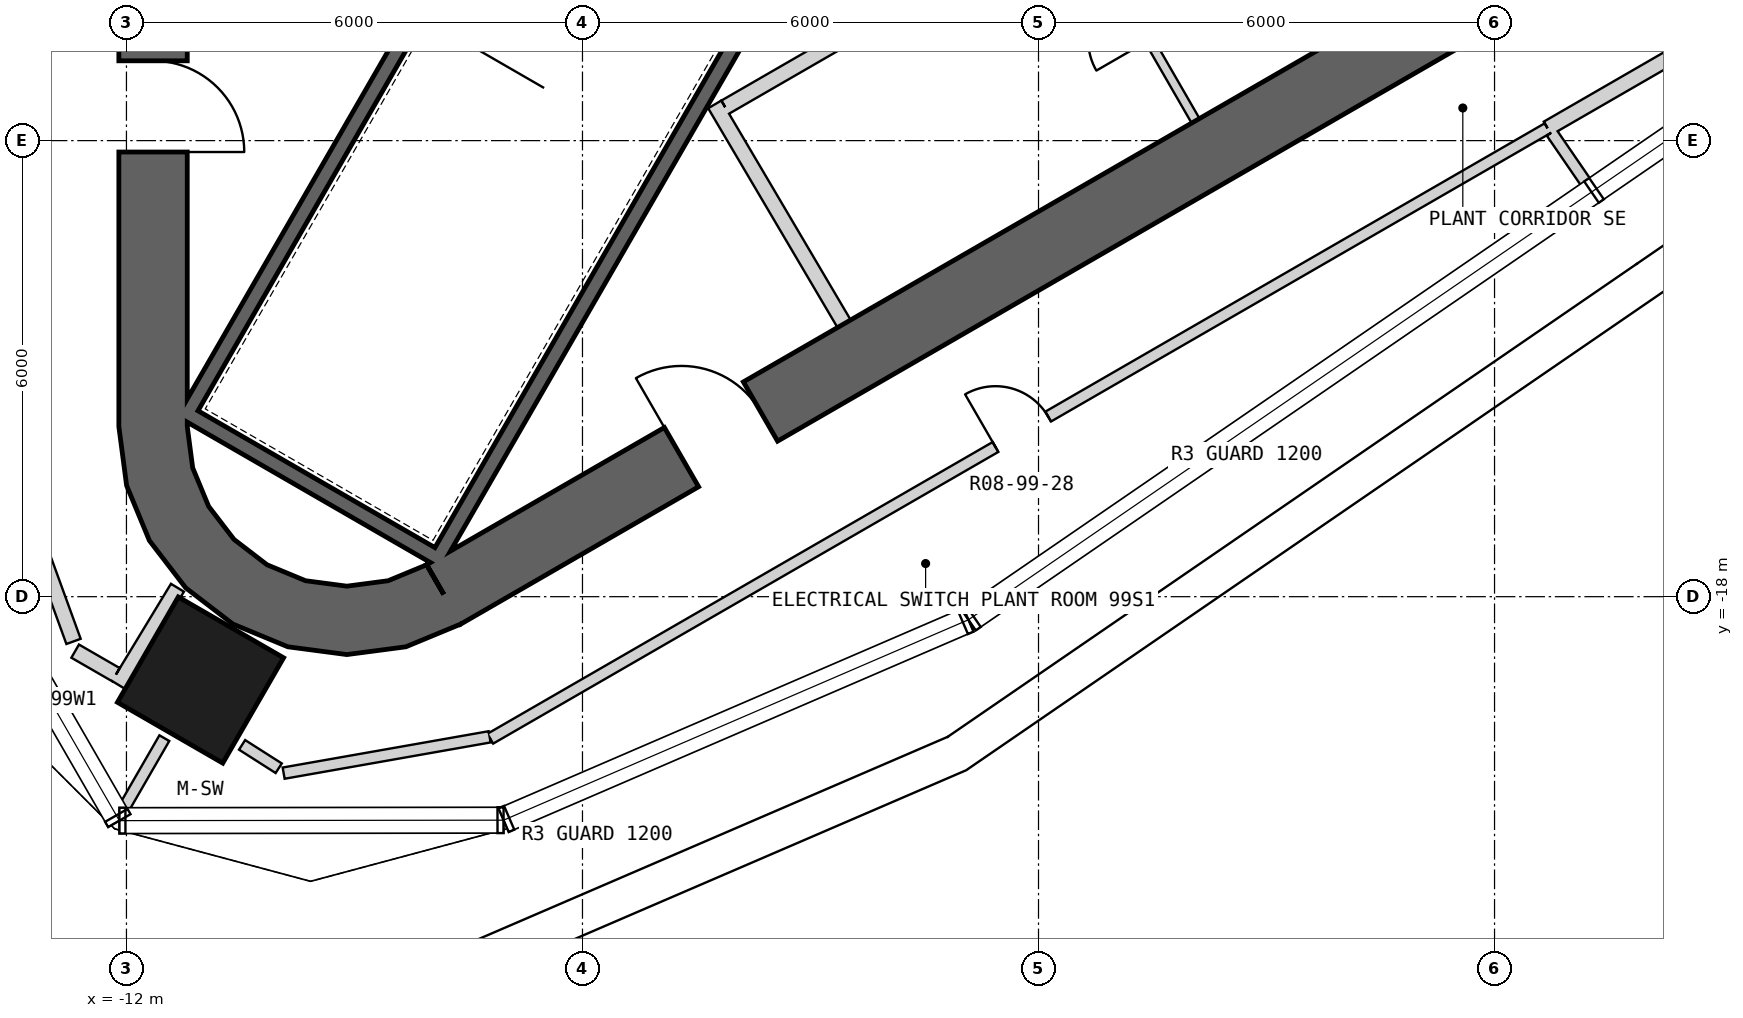
"""IFC4 building model, lengths in metres.
Left out: names, types, materials, properties, quantities, classifications, styles, units other than length and angle.
Written with IfcOpenShell. Run it as: python <this file> out.ifc"""

import sys

from ifc_helpers import new_model, si_unit, direction, frame, frame_2d, origin, origin_2d, place, context, subcontext, project, spatial, polyline, rectangle, outline, extrude, element, fill, save


model = new_model("IFC4")
c1 = context("Model", 3, precision=1e-05, world=origin(), true_north=direction((0.0, 1.0)))
c2 = subcontext(c1, "Body", "Model", "MODEL_VIEW")
j1 = project(units=[si_unit("LENGTHUNIT", "METRE"), si_unit("PLANEANGLEUNIT", "RADIAN")], contexts=[c1])
p1 = place(None, origin())
s1 = spatial("IfcSite", under=j1, at=p1, CompositionType="ELEMENT")
p2 = place(p1, origin())
s2 = spatial("IfcBuilding", under=s1, at=p2, CompositionType="ELEMENT")
p3 = place(p2, frame((0.0, 0.0, 440.3)))
s3 = spatial("IfcBuildingStorey", under=s2, at=p3, CompositionType="ELEMENT", Elevation=440.3)
p4 = place(p3, frame((-11.025, -19.097, 0.0), z_axis=(0.0, 0.0, 1.0), x_axis=(-0.5, -0.866025403784, 0.0)))
e1 = element("IfcColumn", 1, at=p4, inside=s3, PredefinedType="COLUMN", context=c2, shape_type="SweptSolid", body=[
    extrude(rectangle(XDim=1.6, YDim=1.6, at=origin_2d()), origin(), (0.0, 0.0, 1.0), 4.7),
])
p5 = place(p3, frame((-11.65, 15.762, 0.0), z_axis=(0.0, 0.0, 1.0), x_axis=(0.0, -1.0, 0.0)))
e2 = element("IfcWall", 2, at=p5, inside=s3, PredefinedType="SHEAR", context=c2, shape_type="SweptSolid", body=[
    extrude(rectangle(XDim=31.523, YDim=0.9, at=frame_2d((15.762, 0.0))), origin(), (0.0, 0.0, 1.0), 4.7),
])
p6 = place(p5, frame((3.612, 0.0, 0.0)))
e3 = element("IfcOpeningElement", 3, at=p6, cuts=e2, PredefinedType="OPENING", context=c2, shape_type="SweptSolid", body=[
    extrude(rectangle(XDim=1.2, YDim=2.4, at=frame_2d((0.6, 1.2))), frame((0.0, 0.46, 0.0), z_axis=(0.0, -1.0, 0.0), x_axis=(1.0, 0.0, 0.0)), (0.0, 0.0, 1.0), 0.92),
])
p7 = place(p5, frame((26.712, 0.0, 0.0)))
e4 = element("IfcOpeningElement", 4, at=p7, cuts=e2, PredefinedType="OPENING", context=c2, shape_type="SweptSolid", body=[
    extrude(rectangle(XDim=1.2, YDim=2.4, at=frame_2d((0.6, 1.2))), frame((0.0, 0.46, 0.0), z_axis=(0.0, -1.0, 0.0), x_axis=(1.0, 0.0, 0.0)), (0.0, 0.0, 1.0), 0.92),
])
p8 = place(p3, frame((-7.825, -17.97, 0.0), z_axis=(0.0, 0.0, 1.0), x_axis=(0.866028369851, 0.499994862586, 0.0)))
e5 = element("IfcWall", 5, at=p8, inside=s3, PredefinedType="SHEAR", context=c2, shape_type="SweptSolid", body=[
    extrude(rectangle(XDim=31.523, YDim=0.9, at=frame_2d((15.762, 0.0))), origin(), (0.0, 0.0, 1.0), 4.7),
])
p9 = place(p8, frame((17.862, 0.0, 0.0)))
e6 = element("IfcOpeningElement", 6, at=p9, cuts=e5, PredefinedType="OPENING", context=c2, shape_type="SweptSolid", body=[
    extrude(rectangle(XDim=1.2, YDim=2.4, at=frame_2d((0.6, 1.2))), frame((0.0, 0.46, 0.0), z_axis=(0.0, -1.0, 0.0), x_axis=(1.0, 0.0, 0.0)), (0.0, 0.0, 1.0), 0.92),
])
p10 = place(p8, frame((20.562, 0.0, 0.0)))
e7 = element("IfcOpeningElement", 7, at=p10, cuts=e5, PredefinedType="OPENING", context=c2, shape_type="SweptSolid", body=[
    extrude(rectangle(XDim=1.2, YDim=2.4, at=frame_2d((0.6, 1.2))), frame((0.0, 0.46, 0.0), z_axis=(0.0, -1.0, 0.0), x_axis=(1.0, 0.0, 0.0)), (0.0, 0.0, 1.0), 0.92),
])
p11 = place(p8, frame((26.712, 0.0, 0.0)))
e8 = element("IfcOpeningElement", 8, at=p11, cuts=e5, PredefinedType="OPENING", context=c2, shape_type="SweptSolid", body=[
    extrude(rectangle(XDim=1.2, YDim=2.4, at=frame_2d((0.6, 1.2))), frame((0.0, 0.46, 0.0), z_axis=(0.0, -1.0, 0.0), x_axis=(1.0, 0.0, 0.0)), (0.0, 0.0, 1.0), 0.92),
])
p12 = place(p8, frame((3.612, 0.0, 0.0)))
e9 = element("IfcOpeningElement", 9, at=p12, cuts=e5, PredefinedType="OPENING", context=c2, shape_type="SweptSolid", body=[
    extrude(rectangle(XDim=1.2, YDim=2.4, at=frame_2d((0.6, 1.2))), frame((0.0, 0.46, 0.0), z_axis=(0.0, -1.0, 0.0), x_axis=(1.0, 0.0, 0.0)), (0.0, 0.0, 1.0), 0.92),
])
p13 = place(p3, origin())
e10 = element("IfcWall", 10, at=p13, inside=s3, PredefinedType="SHEAR", context=c2, shape_type="SweptSolid", body=[
    extrude(outline(polyline([(-12.1, -15.762), (-11.998, -16.538), (-11.698, -17.262), (-11.221, -17.883), (-10.6, -18.36), (-9.876, -18.659), (-9.1, -18.762), (-8.323, -18.659), (-7.6, -18.36), (-8.05, -17.58), (-8.556, -17.79), (-9.1, -17.862), (-9.644, -17.79), (-10.15, -17.58), (-10.585, -17.247), (-10.919, -16.812), (-11.128, -16.305), (-11.2, -15.762), (-12.1, -15.762)])), origin(), (0.0, 0.0, 1.0), 4.7),
])
p14 = place(p3, frame((-3.905, -10.563, -0.25), z_axis=(0.0, 0.0, 1.0), x_axis=(-0.500012932018, -0.866017937352, 0.0)))
e11 = element("IfcWall", 11, at=p14, inside=s3, PredefinedType="SHEAR", context=c2, shape_type="SweptSolid", body=[
    extrude(rectangle(XDim=8.1, YDim=0.2, at=frame_2d((4.05, 0.0))), origin(), (0.0, 0.0, 1.0), 4.95),
])
p15 = place(p3, frame((-11.282, -15.541, -0.25), z_axis=(0.0, 0.0, 1.0), x_axis=(0.866000483506, -0.500043160704, 0.0)))
e12 = element("IfcWall", 12, at=p15, inside=s3, PredefinedType="SHEAR", context=c2, shape_type="SweptSolid", body=[
    extrude(rectangle(XDim=3.8, YDim=0.2, at=frame_2d((1.9, 0.0))), origin(), (0.0, 0.0, 1.0), 4.95),
])
p16 = place(p3, frame((-7.196, -8.663, -0.25), z_axis=(0.0, 0.0, 1.0), x_axis=(-0.499997992926, -0.866026562566, 0.0)))
e13 = element("IfcWall", 13, at=p16, inside=s3, PredefinedType="SHEAR", context=c2, shape_type="SweptSolid", body=[
    extrude(rectangle(XDim=7.9, YDim=0.2, at=frame_2d((3.95, 0.0))), origin(), (0.0, 0.0, 1.0), 4.95),
])
p17 = place(p3, frame((2.067, -11.74, 0.0), z_axis=(0.0, 0.0, 1.0), x_axis=(-0.499984717929, 0.866034226713, 0.0)))
e14 = element("IfcWall", 14, at=p17, inside=s3, PredefinedType="PARTITIONING", context=c2, shape_type="SweptSolid", body=[
    extrude(rectangle(XDim=3.25, YDim=0.12, at=frame_2d((1.625, 0.0))), origin(), (0.0, 0.0, 1.0), 4.7),
])
p18 = place(p17, frame((1.225, 0.0, 0.0)))
e15 = element("IfcOpeningElement", 15, at=p18, cuts=e14, PredefinedType="OPENING", context=c2, shape_type="SweptSolid", body=[
    extrude(rectangle(XDim=0.8, YDim=2.1, at=frame_2d((0.4, 1.05))), frame((0.0, 0.07, 0.0), z_axis=(0.0, -1.0, 0.0), x_axis=(1.0, 0.0, 0.0)), (0.0, 0.0, 1.0), 0.14),
])
p19 = place(p3, frame((-4.26, -11.524, 0.0), z_axis=(0.0, 0.0, 1.0), x_axis=(0.507997497166, -0.861358544901, 0.0)))
e16 = element("IfcWall", 16, at=p19, inside=s3, PredefinedType="PARTITIONING", context=c2, shape_type="SweptSolid", body=[
    extrude(rectangle(XDim=3.35, YDim=0.2, at=frame_2d((1.675, 0.0))), origin(), (0.0, 0.0, 1.0), 4.7),
])
p20 = place(p3, frame((-1.024, -9.771, 0.0), z_axis=(0.0, 0.0, 1.0), x_axis=(-0.866029903013, -0.499992207027, 0.0)))
e17 = element("IfcWall", 17, at=p20, inside=s3, PredefinedType="PARTITIONING", context=c2, shape_type="SweptSolid", body=[
    extrude(rectangle(XDim=3.578, YDim=0.2, at=frame_2d((1.789, 0.0))), origin(), (0.0, 0.0, 1.0), 4.7),
])
p21 = place(p3, frame((-12.104, -19.161, 0.0), z_axis=(0.0, 0.0, 1.0), x_axis=(0.518475368733, 0.855092563421, 0.0)))
e18 = element("IfcWall", 18, at=p21, inside=s3, PredefinedType="PARTITIONING", context=c2, shape_type="SweptSolid", body=[
    extrude(rectangle(XDim=1.496, YDim=0.2, at=frame_2d((0.748, 0.0))), origin(), (0.0, 0.0, 1.0), 4.7),
])
p22 = place(p3, frame((-12.675, -18.717, 0.0), z_axis=(0.0, 0.0, 1.0), x_axis=(0.866047486323, -0.49996174997, 0.0)))
e19 = element("IfcWall", 19, at=p22, inside=s3, PredefinedType="PARTITIONING", context=c2, shape_type="SweptSolid", body=[
    extrude(rectangle(XDim=0.618, YDim=0.2, at=frame_2d((0.309, 0.0))), origin(), (0.0, 0.0, 1.0), 4.7),
])
p23 = place(p3, frame((-13.634, -16.011, 0.0), z_axis=(0.0, 0.0, 1.0), x_axis=(0.342043269434, -0.939684203248, 0.0)))
e20 = element("IfcWall", 20, at=p23, inside=s3, PredefinedType="PARTITIONING", context=c2, shape_type="SweptSolid", body=[
    extrude(rectangle(XDim=2.742, YDim=0.2, at=frame_2d((1.371, 0.0))), origin(), (0.0, 0.0, 1.0), 4.7),
])
p24 = place(p3, frame((-11.501, -19.861, 0.0), z_axis=(0.0, 0.0, 1.0), x_axis=(-0.500107244371, -0.865963477364, 0.0)))
e21 = element("IfcWall", 21, at=p24, inside=s3, PredefinedType="PLUMBINGWALL", context=c2, shape_type="SweptSolid", body=[
    extrude(rectangle(XDim=1.098, YDim=0.15, at=frame_2d((0.549, 0.0))), origin(), (0.0, 0.0, 1.0), 4.7),
])
p25 = place(p3, frame((-7.213, -19.868, 0.0), z_axis=(0.0, 0.0, 1.0), x_axis=(0.866026120779, 0.499998758127, 0.0)))
e22 = element("IfcWall", 22, at=p25, inside=s3, PredefinedType="PLUMBINGWALL", context=c2, shape_type="SweptSolid", body=[
    extrude(rectangle(XDim=16.062, YDim=0.15, at=frame_2d((8.031, 0.0))), origin(), (0.0, 0.0, 1.0), 4.7),
])
p26 = place(p25, frame((7.675, 0.0, 0.0)))
e23 = element("IfcOpeningElement", 23, at=p26, cuts=e22, PredefinedType="OPENING", context=c2, shape_type="SweptSolid", body=[
    extrude(rectangle(XDim=0.8, YDim=2.1, at=frame_2d((0.4, 1.05))), frame((0.0, 0.085, 0.0), z_axis=(0.0, -1.0, 0.0), x_axis=(1.0, 0.0, 0.0)), (0.0, 0.0, 1.0), 0.17),
])
p27 = place(p3, frame((-9.932, -20.322, 0.0), z_axis=(0.0, 0.0, 1.0), x_axis=(0.984813908974, 0.173613261856, 0.0)))
e24 = element("IfcWall", 24, at=p27, inside=s3, PredefinedType="PLUMBINGWALL", context=c2, shape_type="SweptSolid", body=[
    extrude(rectangle(XDim=2.752, YDim=0.15, at=frame_2d((1.376, 0.0))), origin(), (0.0, 0.0, 1.0), 4.7),
])
p28 = place(p3, frame((-10.479, -19.95, 0.0), z_axis=(0.0, 0.0, 1.0), x_axis=(0.843309487859, -0.537428234917, 0.0)))
e25 = element("IfcWall", 25, at=p28, inside=s3, PredefinedType="PLUMBINGWALL", context=c2, shape_type="SweptSolid", body=[
    extrude(rectangle(XDim=0.572, YDim=0.15, at=frame_2d((0.286, 0.0))), origin(), (0.0, 0.0, 1.0), 4.7),
])
p29 = place(p3, frame((6.698, -11.837, 0.0), z_axis=(0.0, 0.0, 1.0), x_axis=(0.866022444471, 0.500005125646, 0.0)))
e26 = element("IfcWall", 26, at=p29, inside=s3, PredefinedType="PARTITIONING", context=c2, shape_type="SweptSolid", body=[
    extrude(rectangle(XDim=16.124, YDim=0.2, at=frame_2d((8.062, 0.0))), origin(), (0.0, 0.0, 1.0), 4.7),
])
p30 = place(p29, frame((2.044, 0.0, 0.0)))
e27 = element("IfcOpeningElement", 27, at=p30, cuts=e26, PredefinedType="OPENING", context=c2, shape_type="SweptSolid", body=[
    extrude(rectangle(XDim=1.0, YDim=2.1, at=frame_2d((0.5, 1.05))), frame((0.0, 0.11, 0.0), z_axis=(0.0, -1.0, 0.0), x_axis=(1.0, 0.0, 0.0)), (0.0, 0.0, 1.0), 0.22),
])
p31 = place(p3, frame((7.213, -12.568, 0.0), z_axis=(0.0, 0.0, 1.0), x_axis=(-0.565933909506, 0.824450611056, 0.0)))
e28 = element("IfcWall", 28, at=p31, inside=s3, PredefinedType="PLUMBINGWALL", context=c2, shape_type="SweptSolid", body=[
    extrude(rectangle(XDim=0.819, YDim=0.15, at=frame_2d((0.409, 0.0))), origin(), (0.0, 0.0, 1.0), 4.7),
])
p32 = place(p26, origin())
e29 = element("IfcDoor", 29, at=p32, inside=s3, OperationType="SINGLE_SWING_LEFT", PredefinedType="USERDEFINED", context=c2, shape_type="SweptSolid", body=[
    extrude(rectangle(XDim=0.8, YDim=2.1, at=frame_2d((0.4, 1.05))), frame((0.0, 0.025, 0.0), z_axis=(0.0, -1.0, 0.0), x_axis=(1.0, 0.0, 0.0)), (0.0, 0.0, 1.0), 0.05),
])
fill(e23, e29)
p33 = place(p7, origin())
e30 = element("IfcDoor", 30, at=p33, inside=s3, OperationType="SINGLE_SWING_RIGHT", PredefinedType="USERDEFINED", context=c2, shape_type="SweptSolid", body=[
    extrude(rectangle(XDim=1.2, YDim=2.4, at=frame_2d((0.6, 1.2))), frame((0.0, 0.025, 0.0), z_axis=(0.0, -1.0, 0.0), x_axis=(1.0, 0.0, 0.0)), (0.0, 0.0, 1.0), 0.05),
])
fill(e4, e30)
p34 = place(p12, origin())
e31 = element("IfcDoor", 31, at=p34, inside=s3, OperationType="SINGLE_SWING_LEFT", PredefinedType="USERDEFINED", context=c2, shape_type="SweptSolid", body=[
    extrude(rectangle(XDim=1.2, YDim=2.4, at=frame_2d((0.6, 1.2))), frame((0.0, 0.025, 0.0), z_axis=(0.0, -1.0, 0.0), x_axis=(1.0, 0.0, 0.0)), (0.0, 0.0, 1.0), 0.05),
])
fill(e9, e31)
save(model, sys.argv[1])
